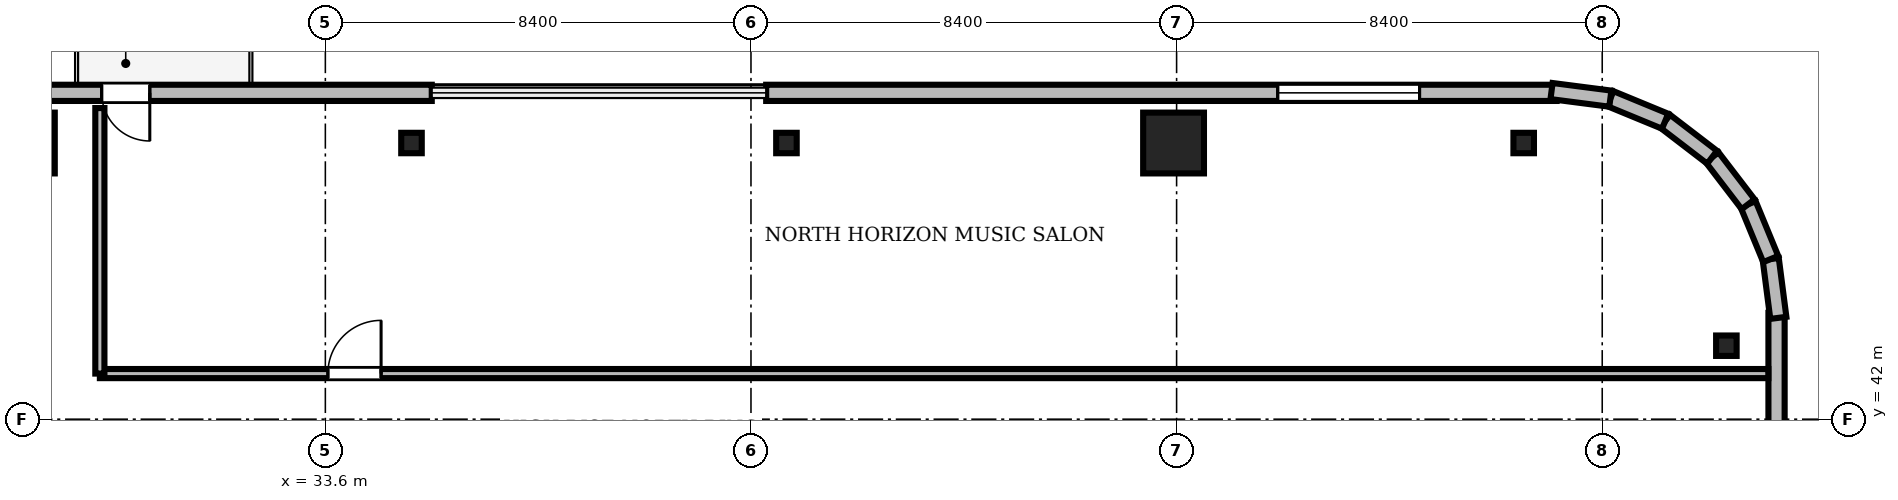
"""IFC4 building model, lengths in metres.
Left out: names, types, materials, properties, quantities, classifications, styles, units other than length and angle.
Written with IfcOpenShell. Run it as: python <this file> out.ifc"""

import sys

from ifc_helpers import new_model, si_unit, direction, frame, frame_2d, origin, origin_2d, place, context, subcontext, project, spatial, rectangle, i_section, extrude, source, transform, mapped, element, fill, save


model = new_model("IFC4")
c1 = context("Model", 3, precision=1e-05, world=origin(), true_north=direction((0.0, 1.0)))
c2 = subcontext(c1, "Body", "Model", "MODEL_VIEW")
j1 = project(units=[si_unit("LENGTHUNIT", "METRE"), si_unit("PLANEANGLEUNIT", "RADIAN")], contexts=[c1])
p1 = place(None, origin())
s1 = spatial("IfcSite", under=j1, at=p1, CompositionType="ELEMENT")
p2 = place(p1, origin())
s2 = spatial("IfcBuilding", under=s1, at=p2, CompositionType="ELEMENT")
p3 = place(p2, frame((0.0, 0.0, 242.7)))
s3 = spatial("IfcBuildingStorey", under=s2, at=p3, CompositionType="ELEMENT", Elevation=242.7)
m1 = source(origin(), c2, "Body", "SweptSolid", [
    extrude(rectangle(XDim=1.2, YDim=1.2, at=origin_2d()), origin(), (0.0, 0.0, 1.0), 3.73),
])
for number, where, z_axis, x_axis in (
    (1, (50.34, 47.45, 0.0), (0.0, 0.0, 1.0), (1.0, 0.0, 0.0)),
    (2, (27.66, 47.45, 0.0), (0.0, 0.0, 1.0), (1.0, 0.0, 0.0)),
):
    element("IfcColumn", number, at=place(p3, frame(where, z_axis=z_axis, x_axis=x_axis)), inside=s3, PredefinedType="COLUMN", context=c2, shape_type="MappedRepresentation", body=[
        mapped(m1, transform((0.0, 0.0, 0.0), scale=1.0)),
    ])
m2 = source(origin(), c2, "Body", "SweptSolid", [
    extrude(i_section(OverallWidth=0.405, OverallDepth=0.403, WebThickness=0.018, FlangeThickness=0.028, FilletRadius=0.015, at=origin_2d()), origin(), (0.0, 0.0, 1.0), 3.73),
])
for number, where, z_axis, x_axis in (
    (3, (61.25, 43.45, 0.0), (0.0, 0.0, 1.0), (1.0, 0.0, 0.0)),
    (4, (57.25, 47.45, 0.0), (0.0, 0.0, 1.0), (1.0, 0.0, 0.0)),
    (5, (42.7, 47.45, 0.0), (0.0, 0.0, 1.0), (1.0, 0.0, 0.0)),
    (6, (35.3, 47.45, 0.0), (0.0, 0.0, 1.0), (1.0, 0.0, 0.0)),
):
    element("IfcColumn", number, at=place(p3, frame(where, z_axis=z_axis, x_axis=x_axis)), inside=s3, PredefinedType="COLUMN", context=c2, shape_type="MappedRepresentation", body=[
        mapped(m2, transform((0.0, 0.0, 0.0), scale=1.0)),
    ])
m3 = source(origin(), c2, "Body", "SweptSolid", [
    extrude(rectangle(XDim=15.6, YDim=0.32, at=frame_2d((7.8, 0.0))), origin(), (0.0, 0.0, 1.0), 3.73),
])
p4 = place(p3, frame((57.9, 48.44, 0.0), z_axis=(0.0, 0.0, 1.0), x_axis=(-1.0, 0.0, 0.0)))
e7 = element("IfcWall", 7, at=p4, inside=s3, PredefinedType="SOLIDWALL", context=c2, shape_type="MappedRepresentation", body=[
    mapped(m3, transform((0.0, 0.0, 0.0), scale=1.0)),
])
m4 = source(origin(), c2, "Body", "SweptSolid", [
    extrude(rectangle(XDim=2.8, YDim=2.4, at=frame_2d((1.4, 1.2))), frame((0.0, 0.17, 0.0), z_axis=(0.0, -1.0, 0.0), x_axis=(1.0, 0.0, 0.0)), (0.0, 0.0, 1.0), 0.34),
])
p5 = place(p4, frame((2.705, 0.0, 0.72)))
e8 = element("IfcOpeningElement", 8, at=p5, cuts=e7, PredefinedType="OPENING", context=c2, shape_type="MappedRepresentation", body=[
    mapped(m4, transform((0.0, 0.0, 0.0), scale=1.0)),
])
p6 = place(p3, frame((35.7, 48.44, 0.0), z_axis=(0.0, 0.0, 1.0), x_axis=(-1.0, 0.0, 0.0)))
e9 = element("IfcWall", 9, at=p6, inside=s3, PredefinedType="SOLIDWALL", context=c2, shape_type="MappedRepresentation", body=[
    mapped(m3, transform((0.0, 0.0, 0.0), scale=1.0)),
])
m5 = source(origin(), c2, "Body", "SweptSolid", [
    extrude(rectangle(XDim=0.95, YDim=2.3, at=frame_2d((0.475, 1.15))), frame((0.0, 0.17, 0.0), z_axis=(0.0, -1.0, 0.0), x_axis=(1.0, 0.0, 0.0)), (0.0, 0.0, 1.0), 0.34),
])
p7 = place(p6, frame((5.565, 0.0, 0.0)))
e10 = element("IfcOpeningElement", 10, at=p7, cuts=e9, PredefinedType="OPENING", context=c2, shape_type="MappedRepresentation", body=[
    mapped(m5, transform((0.0, 0.0, 0.0), scale=1.0)),
])
p8 = place(p6, frame((10.095, 0.0, 0.72)))
e11 = element("IfcOpeningElement", 11, at=p8, cuts=e9, PredefinedType="OPENING", context=c2, shape_type="MappedRepresentation", body=[
    mapped(m4, transform((0.0, 0.0, 0.0), scale=1.0)),
])
m6 = source(origin(), c2, "Body", "SweptSolid", [
    extrude(rectangle(XDim=15.6, YDim=0.32, at=frame_2d((7.8, 0.0))), origin(), (0.0, 0.0, 1.0), 3.73),
])
p9 = place(p3, frame((62.24, 28.5, 0.0), z_axis=(0.0, 0.0, 1.0), x_axis=(0.0, 1.0, 0.0)))
e12 = element("IfcWall", 12, at=p9, inside=s3, PredefinedType="SOLIDWALL", context=c2, shape_type="MappedRepresentation", body=[
    mapped(m6, transform((0.0, 0.0, 0.0), scale=1.0)),
])
p10 = place(p9, frame((10.095, 0.0, 0.72)))
e13 = element("IfcOpeningElement", 13, at=p10, cuts=e12, PredefinedType="OPENING", context=c2, shape_type="MappedRepresentation", body=[
    mapped(m4, transform((0.0, 0.0, 0.0), scale=1.0)),
])
m7 = source(origin(), c2, "Body", "SweptSolid", [
    extrude(rectangle(XDim=1.17, YDim=0.32, at=frame_2d((0.585, 0.0))), origin(), (0.0, 0.0, 1.0), 3.73),
])
p11 = place(p3, frame((62.276, 44.0, 0.0), z_axis=(0.0, 0.0, 1.0), x_axis=(-0.128295670475, 0.991735963317, 0.0)))
e14 = element("IfcWall", 14, at=p11, inside=s3, PredefinedType="SOLIDWALL", context=c2, shape_type="MappedRepresentation", body=[
    mapped(m7, transform((0.0, 0.0, 0.0), scale=1.0)),
])
m8 = source(origin(), c2, "Body", "SweptSolid", [
    extrude(rectangle(XDim=1.169, YDim=0.32, at=frame_2d((0.584, 0.0))), origin(), (0.0, 0.0, 1.0), 3.73),
])
p12 = place(p3, frame((62.125, 45.16, 0.0), z_axis=(0.0, 0.0, 1.0), x_axis=(-0.381054331552, 0.924552646638, 0.0)))
e15 = element("IfcWall", 15, at=p12, inside=s3, PredefinedType="SOLIDWALL", context=c2, shape_type="MappedRepresentation", body=[
    mapped(m8, transform((0.0, 0.0, 0.0), scale=1.0)),
])
m9 = source(origin(), c2, "Body", "SweptSolid", [
    extrude(rectangle(XDim=1.169, YDim=0.32, at=frame_2d((0.584, 0.0))), origin(), (0.0, 0.0, 1.0), 3.73),
])
p13 = place(p3, frame((61.68, 46.241, 0.0), z_axis=(0.0, 0.0, 1.0), x_axis=(-0.608387696831, 0.793639975269, 0.0)))
e16 = element("IfcWall", 16, at=p13, inside=s3, PredefinedType="SOLIDWALL", context=c2, shape_type="MappedRepresentation", body=[
    mapped(m9, transform((0.0, 0.0, 0.0), scale=1.0)),
])
m10 = source(origin(), c2, "Body", "SweptSolid", [
    extrude(rectangle(XDim=1.169, YDim=0.32, at=frame_2d((0.584, 0.0))), origin(), (0.0, 0.0, 1.0), 3.73),
])
p14 = place(p3, frame((60.969, 47.169, 0.0), z_axis=(0.0, 0.0, 1.0), x_axis=(-0.793663520347, 0.608356981114, 0.0)))
e17 = element("IfcWall", 17, at=p14, inside=s3, PredefinedType="SOLIDWALL", context=c2, shape_type="MappedRepresentation", body=[
    mapped(m10, transform((0.0, 0.0, 0.0), scale=1.0)),
])
p15 = place(p3, frame((60.041, 47.88, 0.0), z_axis=(0.0, 0.0, 1.0), x_axis=(-0.924552646638, 0.381054331552, 0.0)))
e18 = element("IfcWall", 18, at=p15, inside=s3, PredefinedType="SOLIDWALL", context=c2, shape_type="MappedRepresentation", body=[
    mapped(m8, transform((0.0, 0.0, 0.0), scale=1.0)),
])
p16 = place(p3, frame((58.96, 48.325, 0.0), z_axis=(0.0, 0.0, 1.0), x_axis=(-0.991735963317, 0.128295670475, 0.0)))
e19 = element("IfcWall", 19, at=p16, inside=s3, PredefinedType="SOLIDWALL", context=c2, shape_type="MappedRepresentation", body=[
    mapped(m7, transform((0.0, 0.0, 0.0), scale=1.0)),
])
m11 = source(origin(), c2, "Body", "SweptSolid", [
    extrude(rectangle(XDim=32.928, YDim=0.18, at=frame_2d((16.464, 0.0))), origin(), (0.0, 0.0, 1.0), 2.972),
])
p17 = place(p3, frame((29.15, 42.9, 0.0), z_axis=(0.0, 0.0, 1.0), x_axis=(1.0, 0.0, 0.0)))
e20 = element("IfcWall", 20, at=p17, inside=s3, PredefinedType="PARTITIONING", context=c2, shape_type="MappedRepresentation", body=[
    mapped(m11, transform((0.0, 0.0, 0.0), scale=1.0)),
])
m12 = source(origin(), c2, "Body", "SweptSolid", [
    extrude(rectangle(XDim=1.05, YDim=2.2, at=frame_2d((0.525, 1.1))), frame((0.0, 0.1, 0.0), z_axis=(0.0, -1.0, 0.0), x_axis=(1.0, 0.0, 0.0)), (0.0, 0.0, 1.0), 0.2),
])
p18 = place(p17, frame((4.5, 0.0, 0.0)))
e21 = element("IfcOpeningElement", 21, at=p18, cuts=e20, PredefinedType="OPENING", context=c2, shape_type="MappedRepresentation", body=[
    mapped(m12, transform((0.0, 0.0, 0.0), scale=1.0)),
])
m13 = source(origin(), c2, "Body", "SweptSolid", [
    extrude(rectangle(XDim=5.24, YDim=0.18, at=frame_2d((2.62, 0.0))), origin(), (0.0, 0.0, 1.0), 2.972),
])
p19 = place(p3, frame((29.15, 42.9, 0.0), z_axis=(0.0, 0.0, 1.0), x_axis=(0.0, 1.0, 0.0)))
e22 = element("IfcWall", 22, at=p19, inside=s3, PredefinedType="PARTITIONING", context=c2, shape_type="MappedRepresentation", body=[
    mapped(m13, transform((0.0, 0.0, 0.0), scale=1.0)),
])
m14 = source(origin(), c2, "Body", "SweptSolid", [
    extrude(rectangle(XDim=0.95, YDim=2.3, at=frame_2d((0.475, 1.15))), frame((0.0, 0.025, 0.0), z_axis=(0.0, -1.0, 0.0), x_axis=(1.0, 0.0, 0.0)), (0.0, 0.0, 1.0), 0.05),
])
p20 = place(p7, frame((0.95, 0.0, 0.0), z_axis=(0.0, 0.0, 1.0), x_axis=(-1.0, 0.0, 0.0)))
e23 = element("IfcDoor", 23, at=p20, inside=s3, OperationType="NOTDEFINED", PredefinedType="DOOR", context=c2, shape_type="MappedRepresentation", body=[
    mapped(m14, transform((0.0, 0.0, 0.0), scale=1.0)),
])
fill(e10, e23)
m15 = source(origin(), c2, "Body", "SweptSolid", [
    extrude(rectangle(XDim=2.8, YDim=2.4, at=frame_2d((1.4, 1.2))), frame((0.0, 0.03, 0.0), z_axis=(0.0, -1.0, 0.0), x_axis=(1.0, 0.0, 0.0)), (0.0, 0.0, 1.0), 0.06),
])
p21 = place(p5, origin())
e24 = element("IfcWindow", 24, at=p21, inside=s3, PartitioningType="SINGLE_PANEL", PredefinedType="WINDOW", context=c2, shape_type="MappedRepresentation", body=[
    mapped(m15, transform((0.0, 0.0, 0.0), scale=1.0)),
])
fill(e8, e24)
m16 = source(origin(), c2, "Body", "SweptSolid", [
    extrude(rectangle(XDim=1.05, YDim=2.2, at=frame_2d((0.525, 1.1))), frame((0.0, 0.025, 0.0), z_axis=(0.0, -1.0, 0.0), x_axis=(1.0, 0.0, 0.0)), (0.0, 0.0, 1.0), 0.05),
])
p22 = place(p18, origin())
e25 = element("IfcDoor", 25, at=p22, inside=s3, OperationType="SINGLE_SWING_RIGHT", PredefinedType="DOOR", context=c2, shape_type="MappedRepresentation", body=[
    mapped(m16, transform((0.0, 0.0, 0.0), scale=1.0)),
])
fill(e21, e25)
save(model, sys.argv[1])
